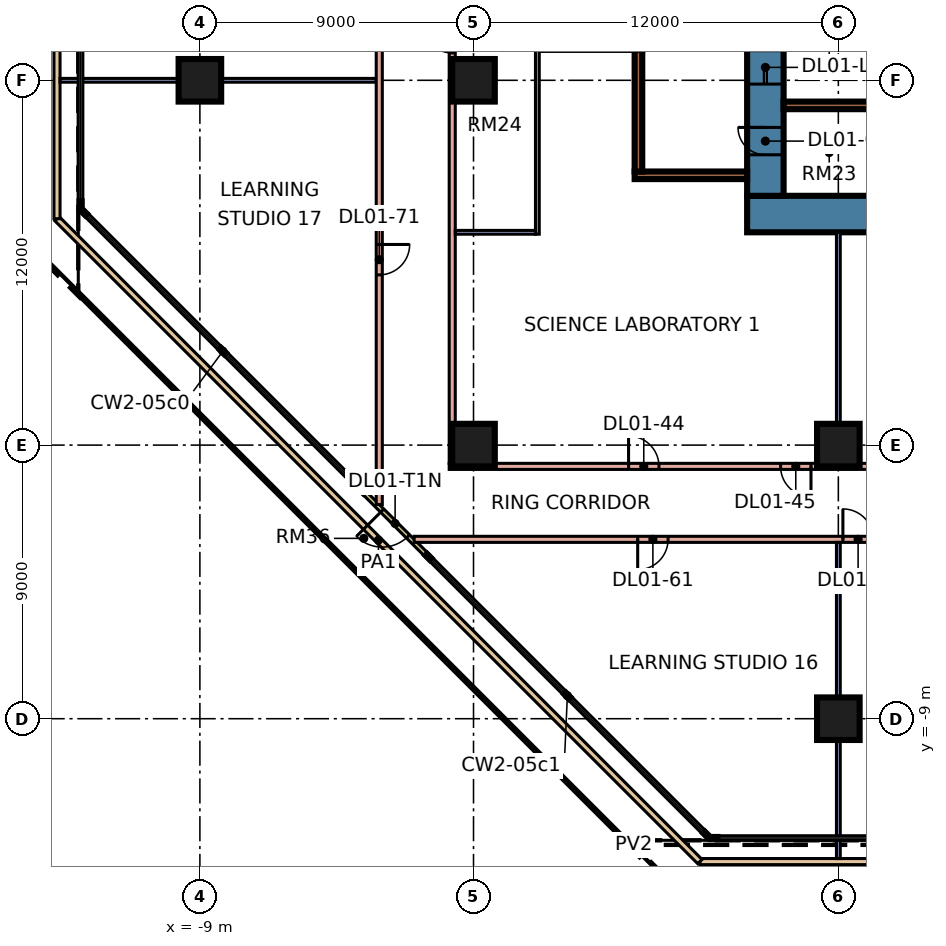
"""IFC4 building model, lengths in metres.
Left out: names, types, materials, properties, quantities, classifications, styles, units other than length and angle.
Written with IfcOpenShell. Run it as: python <this file> out.ifc"""

import sys

from ifc_helpers import new_model, si_unit, direction, frame, frame_2d, origin, origin_2d, place, context, subcontext, project, spatial, rectangle, extrude, element, fill, save


model = new_model("IFC4")
c1 = context("Model", 3, precision=1e-05, world=origin(), true_north=direction((0.0, 1.0)))
c2 = subcontext(c1, "Body", "Model", "MODEL_VIEW")
j1 = project(units=[si_unit("LENGTHUNIT", "METRE"), si_unit("PLANEANGLEUNIT", "RADIAN")], contexts=[c1])
p1 = place(None, origin())
s1 = spatial("IfcSite", under=j1, at=p1, CompositionType="ELEMENT")
p2 = place(p1, origin())
s2 = spatial("IfcBuilding", under=s1, at=p2, CompositionType="ELEMENT")
p3 = place(p2, frame((0.0, 0.0, 7.2)))
s3 = spatial("IfcBuildingStorey", under=s2, at=p3, CompositionType="ELEMENT", Elevation=7.2)
for number, where, z_axis, x_axis in (
    (1, (12.0, -9.0, 0.0), (0.0, 0.0, 1.0), (1.0, 0.0, 0.0)),
    (2, (0.0, 0.0, 0.0), (0.0, 0.0, 1.0), (1.0, 0.0, 0.0)),
    (3, (12.0, 0.0, 0.0), (0.0, 0.0, 1.0), (1.0, 0.0, 0.0)),
    (4, (-9.0, 12.0, 0.0), (0.0, 0.0, 1.0), (1.0, 0.0, 0.0)),
    (5, (0.0, 12.0, 0.0), (0.0, 0.0, 1.0), (1.0, 0.0, 0.0)),
):
    element("IfcColumn", number, at=place(p3, frame(where, z_axis=z_axis, x_axis=x_axis)), inside=s3, PredefinedType="COLUMN", context=c2, shape_type="SweptSolid", body=[
        extrude(rectangle(XDim=1.4, YDim=1.4, at=origin_2d()), origin(), (0.0, 0.0, 1.0), 4.8),
    ])
p4 = place(p3, frame((9.0, 7.6, 0.0), z_axis=(0.0, 0.0, 1.0), x_axis=(1.0, 0.0, 0.0)))
e6 = element("IfcWall", 6, at=p4, inside=s3, PredefinedType="SHEAR", context=c2, shape_type="SweptSolid", body=[
    extrude(rectangle(XDim=25.0, YDim=1.2, at=frame_2d((12.5, 0.0))), origin(), (0.0, 0.0, 1.0), 4.8),
])
p5 = place(p3, frame((9.6, 8.2, 0.0), z_axis=(0.0, 0.0, 1.0), x_axis=(0.0, 1.0, 0.0)))
e7 = element("IfcWall", 7, at=p5, inside=s3, PredefinedType="SHEAR", context=c2, shape_type="SweptSolid", body=[
    extrude(rectangle(XDim=10.6, YDim=1.2, at=frame_2d((5.3, 0.0))), origin(), (0.0, 0.0, 1.0), 4.8),
])
p6 = place(p5, frame((3.675, 0.0, 0.0)))
e8 = element("IfcOpeningElement", 8, at=p6, cuts=e7, PredefinedType="OPENING", context=c2, shape_type="SweptSolid", body=[
    extrude(rectangle(XDim=1.1, YDim=2.2, at=frame_2d((0.55, 1.1))), frame((0.0, 0.61, 0.0), z_axis=(0.0, -1.0, 0.0), x_axis=(1.0, 0.0, 0.0)), (0.0, 0.0, 1.0), 1.22),
])
p7 = place(p5, frame((6.175, 0.0, 0.0)))
e9 = element("IfcOpeningElement", 9, at=p7, cuts=e7, PredefinedType="OPENING", context=c2, shape_type="SweptSolid", body=[
    extrude(rectangle(XDim=1.1, YDim=2.2, at=frame_2d((0.55, 1.1))), frame((0.0, 0.61, 0.0), z_axis=(0.0, -1.0, 0.0), x_axis=(1.0, 0.0, 0.0)), (0.0, 0.0, 1.0), 1.22),
])
p8 = place(p5, frame((8.8, 0.0, 0.0)))
e10 = element("IfcOpeningElement", 10, at=p8, cuts=e7, PredefinedType="OPENING", context=c2, shape_type="SweptSolid", body=[
    extrude(rectangle(XDim=1.1, YDim=2.2, at=frame_2d((0.55, 1.1))), frame((0.0, 0.61, 0.0), z_axis=(0.0, -1.0, 0.0), x_axis=(1.0, 0.0, 0.0)), (0.0, 0.0, 1.0), 1.22),
])
p9 = place(p5, frame((1.35, 0.0, 0.0)))
e11 = element("IfcOpeningElement", 11, at=p9, cuts=e7, PredefinedType="OPENING", context=c2, shape_type="SweptSolid", body=[
    extrude(rectangle(XDim=0.9, YDim=2.1, at=frame_2d((0.45, 1.05))), frame((0.0, 0.61, 0.0), z_axis=(0.0, -1.0, 0.0), x_axis=(1.0, 0.0, 0.0)), (0.0, 0.0, 1.0), 1.22),
])
p10 = place(p3, frame((10.2, 11.175, 0.0), z_axis=(0.0, 0.0, 1.0), x_axis=(1.0, 0.0, 0.0)))
e12 = element("IfcWall", 12, at=p10, inside=s3, PredefinedType="SHEAR", context=c2, shape_type="SweptSolid", body=[
    extrude(rectangle(XDim=3.0, YDim=0.25, at=frame_2d((1.5, 0.0))), origin(), (0.0, 0.0, 1.0), 4.8),
])
p11 = place(p3, frame((5.3, 8.875, 0.0), z_axis=(0.0, 0.0, 1.0), x_axis=(1.0, 0.0, 0.0)))
e13 = element("IfcWall", 13, at=p11, inside=s3, PredefinedType="SHEAR", context=c2, shape_type="SweptSolid", body=[
    extrude(rectangle(XDim=3.7, YDim=0.25, at=frame_2d((1.85, 0.0))), origin(), (0.0, 0.0, 1.0), 4.8),
])
p12 = place(p3, frame((5.425, 9.0, 0.0), z_axis=(0.0, 0.0, 1.0), x_axis=(0.0, 1.0, 0.0)))
e14 = element("IfcWall", 14, at=p12, inside=s3, PredefinedType="SHEAR", context=c2, shape_type="SweptSolid", body=[
    extrude(rectangle(XDim=4.0, YDim=0.25, at=frame_2d((2.0, 0.0))), origin(), (0.0, 0.0, 1.0), 4.8),
])
p13 = place(p3, frame((-3.639, -1.518, 0.0), z_axis=(0.0, 0.0, 1.0), x_axis=(0.707106781187, -0.707106781187, 0.0)))
e15 = element("IfcWall", 15, at=p13, inside=s3, PredefinedType="SOLIDWALL", context=c2, shape_type="SweptSolid", body=[
    extrude(rectangle(XDim=3.0, YDim=0.15, at=frame_2d((1.5, 0.0))), origin(), (0.0, 0.0, 1.0), 4.4),
])
p14 = place(p13, frame((0.9, 0.0, 0.0)))
e16 = element("IfcOpeningElement", 16, at=p14, cuts=e15, PredefinedType="OPENING", context=c2, shape_type="SweptSolid", body=[
    extrude(rectangle(XDim=1.2, YDim=2.4, at=frame_2d((0.6, 1.2))), frame((0.0, 0.085, 0.0), z_axis=(0.0, -1.0, 0.0), x_axis=(1.0, 0.0, 0.0)), (0.0, 0.0, 1.0), 0.17),
])
p15 = place(p3, frame((75.553, -13.7, 0.0), z_axis=(0.0, 0.0, 1.0), x_axis=(-1.0, 0.0, 0.0)))
e17 = element("IfcWall", 17, at=p15, inside=s3, PredefinedType="PARAPET", context=c2, shape_type="SweptSolid", body=[
    extrude(rectangle(XDim=68.107, YDim=0.2, at=frame_2d((34.053, 0.0))), origin(), (0.0, 0.0, 1.0), 0.5),
])
p16 = place(p3, frame((7.447, -13.7, 0.0), z_axis=(0.0, 0.0, 1.0), x_axis=(-0.707106781187, 0.707106781187, 0.0)))
e18 = element("IfcWall", 18, at=p16, inside=s3, PredefinedType="PARAPET", context=c2, shape_type="SweptSolid", body=[
    extrude(rectangle(XDim=29.906, YDim=0.2, at=frame_2d((14.953, 0.0))), origin(), (0.0, 0.0, 1.0), 0.5),
])
p17 = place(p3, frame((-13.7, 7.447, 0.0), z_axis=(0.0, 0.0, 1.0), x_axis=(0.0, 1.0, 0.0)))
e19 = element("IfcWall", 19, at=p17, inside=s3, PredefinedType="PARAPET", context=c2, shape_type="SweptSolid", body=[
    extrude(rectangle(XDim=59.107, YDim=0.2, at=frame_2d((29.553, 0.0))), origin(), (0.0, 0.0, 1.0), 0.5),
])
p18 = place(p3, frame((-13.6, 12.0, 0.0), z_axis=(0.0, 0.0, 1.0), x_axis=(1.0, 0.0, 0.0)))
e20 = element("IfcWall", 20, at=p18, inside=s3, PredefinedType="PARTITIONING", context=c2, shape_type="SweptSolid", body=[
    extrude(rectangle(XDim=10.4, YDim=0.125, at=frame_2d((5.2, 0.0))), origin(), (0.0, 0.0, 1.0), 4.4),
])
p19 = place(p3, frame((-3.1, -1.953, 0.0), z_axis=(0.0, 0.0, 1.0), x_axis=(0.0, 1.0, 0.0)))
e21 = element("IfcWall", 21, at=p19, inside=s3, PredefinedType="PARTITIONING", context=c2, shape_type="SweptSolid", body=[
    extrude(rectangle(XDim=68.053, YDim=0.2, at=frame_2d((34.026, 0.0))), origin(), (0.0, 0.0, 1.0), 4.4),
])
p20 = place(p19, frame((7.553, 0.0, 0.0)))
e22 = element("IfcOpeningElement", 22, at=p20, cuts=e21, PredefinedType="OPENING", context=c2, shape_type="SweptSolid", body=[
    extrude(rectangle(XDim=1.0, YDim=2.1, at=frame_2d((0.5, 1.05))), frame((0.0, 0.11, 0.0), z_axis=(0.0, -1.0, 0.0), x_axis=(1.0, 0.0, 0.0)), (0.0, 0.0, 1.0), 0.22),
])
p21 = place(p19, frame((19.553, 0.0, 0.0)))
e23 = element("IfcOpeningElement", 23, at=p21, cuts=e21, PredefinedType="OPENING", context=c2, shape_type="SweptSolid", body=[
    extrude(rectangle(XDim=1.0, YDim=2.1, at=frame_2d((0.5, 1.05))), frame((0.0, 0.11, 0.0), z_axis=(0.0, -1.0, 0.0), x_axis=(1.0, 0.0, 0.0)), (0.0, 0.0, 1.0), 0.22),
])
p22 = place(p19, frame((24.803, 0.0, 0.0)))
e24 = element("IfcOpeningElement", 24, at=p22, cuts=e21, PredefinedType="OPENING", context=c2, shape_type="SweptSolid", body=[
    extrude(rectangle(XDim=1.0, YDim=2.1, at=frame_2d((0.5, 1.05))), frame((0.0, 0.11, 0.0), z_axis=(0.0, -1.0, 0.0), x_axis=(1.0, 0.0, 0.0)), (0.0, 0.0, 1.0), 0.22),
])
p23 = place(p19, frame((31.553, 0.0, 0.0)))
e25 = element("IfcOpeningElement", 25, at=p23, cuts=e21, PredefinedType="OPENING", context=c2, shape_type="SweptSolid", body=[
    extrude(rectangle(XDim=1.0, YDim=2.1, at=frame_2d((0.5, 1.05))), frame((0.0, 0.11, 0.0), z_axis=(0.0, -1.0, 0.0), x_axis=(1.0, 0.0, 0.0)), (0.0, 0.0, 1.0), 0.22),
])
p24 = place(p19, frame((36.803, 0.0, 0.0)))
e26 = element("IfcOpeningElement", 26, at=p24, cuts=e21, PredefinedType="OPENING", context=c2, shape_type="SweptSolid", body=[
    extrude(rectangle(XDim=1.0, YDim=2.1, at=frame_2d((0.5, 1.05))), frame((0.0, 0.11, 0.0), z_axis=(0.0, -1.0, 0.0), x_axis=(1.0, 0.0, 0.0)), (0.0, 0.0, 1.0), 0.22),
])
p25 = place(p19, frame((42.053, 0.0, 0.0)))
e27 = element("IfcOpeningElement", 27, at=p25, cuts=e21, PredefinedType="OPENING", context=c2, shape_type="SweptSolid", body=[
    extrude(rectangle(XDim=1.0, YDim=2.1, at=frame_2d((0.5, 1.05))), frame((0.0, 0.11, 0.0), z_axis=(0.0, -1.0, 0.0), x_axis=(1.0, 0.0, 0.0)), (0.0, 0.0, 1.0), 0.22),
])
p26 = place(p19, frame((51.053, 0.0, 0.0)))
e28 = element("IfcOpeningElement", 28, at=p26, cuts=e21, PredefinedType="OPENING", context=c2, shape_type="SweptSolid", body=[
    extrude(rectangle(XDim=1.0, YDim=2.1, at=frame_2d((0.5, 1.05))), frame((0.0, 0.11, 0.0), z_axis=(0.0, -1.0, 0.0), x_axis=(1.0, 0.0, 0.0)), (0.0, 0.0, 1.0), 0.22),
])
p27 = place(p19, frame((60.053, 0.0, 0.0)))
e29 = element("IfcOpeningElement", 29, at=p27, cuts=e21, PredefinedType="OPENING", context=c2, shape_type="SweptSolid", body=[
    extrude(rectangle(XDim=1.0, YDim=2.1, at=frame_2d((0.5, 1.05))), frame((0.0, 0.11, 0.0), z_axis=(0.0, -1.0, 0.0), x_axis=(1.0, 0.0, 0.0)), (0.0, 0.0, 1.0), 0.22),
])
p28 = place(p19, frame((65.903, 0.0, 0.0)))
e30 = element("IfcOpeningElement", 30, at=p28, cuts=e21, PredefinedType="OPENING", context=c2, shape_type="SweptSolid", body=[
    extrude(rectangle(XDim=1.0, YDim=2.1, at=frame_2d((0.5, 1.05))), frame((0.0, 0.11, 0.0), z_axis=(0.0, -1.0, 0.0), x_axis=(1.0, 0.0, 0.0)), (0.0, 0.0, 1.0), 0.22),
])
p29 = place(p3, frame((-1.953, -3.1, 0.0), z_axis=(0.0, 0.0, 1.0), x_axis=(1.0, 0.0, 0.0)))
e31 = element("IfcWall", 31, at=p29, inside=s3, PredefinedType="PARTITIONING", context=c2, shape_type="SweptSolid", body=[
    extrude(rectangle(XDim=77.053, YDim=0.2, at=frame_2d((38.526, 0.0))), origin(), (0.0, 0.0, 1.0), 4.4),
])
p30 = place(p29, frame((7.353, 0.0, 0.0)))
e32 = element("IfcOpeningElement", 32, at=p30, cuts=e31, PredefinedType="OPENING", context=c2, shape_type="SweptSolid", body=[
    extrude(rectangle(XDim=1.0, YDim=2.1, at=frame_2d((0.5, 1.05))), frame((0.0, 0.11, 0.0), z_axis=(0.0, -1.0, 0.0), x_axis=(1.0, 0.0, 0.0)), (0.0, 0.0, 1.0), 0.22),
])
p31 = place(p29, frame((19.353, 0.0, 0.0)))
e33 = element("IfcOpeningElement", 33, at=p31, cuts=e31, PredefinedType="OPENING", context=c2, shape_type="SweptSolid", body=[
    extrude(rectangle(XDim=1.0, YDim=2.1, at=frame_2d((0.5, 1.05))), frame((0.0, 0.11, 0.0), z_axis=(0.0, -1.0, 0.0), x_axis=(1.0, 0.0, 0.0)), (0.0, 0.0, 1.0), 0.22),
])
p32 = place(p29, frame((14.103, 0.0, 0.0)))
e34 = element("IfcOpeningElement", 34, at=p32, cuts=e31, PredefinedType="OPENING", context=c2, shape_type="SweptSolid", body=[
    extrude(rectangle(XDim=1.0, YDim=2.1, at=frame_2d((0.5, 1.05))), frame((0.0, 0.11, 0.0), z_axis=(0.0, -1.0, 0.0), x_axis=(1.0, 0.0, 0.0)), (0.0, 0.0, 1.0), 0.22),
])
p33 = place(p29, frame((31.353, 0.0, 0.0)))
e35 = element("IfcOpeningElement", 35, at=p33, cuts=e31, PredefinedType="OPENING", context=c2, shape_type="SweptSolid", body=[
    extrude(rectangle(XDim=1.0, YDim=2.1, at=frame_2d((0.5, 1.05))), frame((0.0, 0.11, 0.0), z_axis=(0.0, -1.0, 0.0), x_axis=(1.0, 0.0, 0.0)), (0.0, 0.0, 1.0), 0.22),
])
p34 = place(p29, frame((26.103, 0.0, 0.0)))
e36 = element("IfcOpeningElement", 36, at=p34, cuts=e31, PredefinedType="OPENING", context=c2, shape_type="SweptSolid", body=[
    extrude(rectangle(XDim=1.0, YDim=2.1, at=frame_2d((0.5, 1.05))), frame((0.0, 0.11, 0.0), z_axis=(0.0, -1.0, 0.0), x_axis=(1.0, 0.0, 0.0)), (0.0, 0.0, 1.0), 0.22),
])
p35 = place(p29, frame((41.853, 0.0, 0.0)))
e37 = element("IfcOpeningElement", 37, at=p35, cuts=e31, PredefinedType="OPENING", context=c2, shape_type="SweptSolid", body=[
    extrude(rectangle(XDim=1.0, YDim=2.1, at=frame_2d((0.5, 1.05))), frame((0.0, 0.11, 0.0), z_axis=(0.0, -1.0, 0.0), x_axis=(1.0, 0.0, 0.0)), (0.0, 0.0, 1.0), 0.22),
])
p36 = place(p29, frame((50.853, 0.0, 0.0)))
e38 = element("IfcOpeningElement", 38, at=p36, cuts=e31, PredefinedType="OPENING", context=c2, shape_type="SweptSolid", body=[
    extrude(rectangle(XDim=1.0, YDim=2.1, at=frame_2d((0.5, 1.05))), frame((0.0, 0.11, 0.0), z_axis=(0.0, -1.0, 0.0), x_axis=(1.0, 0.0, 0.0)), (0.0, 0.0, 1.0), 0.22),
])
p37 = place(p29, frame((59.853, 0.0, 0.0)))
e39 = element("IfcOpeningElement", 39, at=p37, cuts=e31, PredefinedType="OPENING", context=c2, shape_type="SweptSolid", body=[
    extrude(rectangle(XDim=1.0, YDim=2.1, at=frame_2d((0.5, 1.05))), frame((0.0, 0.11, 0.0), z_axis=(0.0, -1.0, 0.0), x_axis=(1.0, 0.0, 0.0)), (0.0, 0.0, 1.0), 0.22),
])
p38 = place(p29, frame((68.853, 0.0, 0.0)))
e40 = element("IfcOpeningElement", 40, at=p38, cuts=e31, PredefinedType="OPENING", context=c2, shape_type="SweptSolid", body=[
    extrude(rectangle(XDim=1.0, YDim=2.1, at=frame_2d((0.5, 1.05))), frame((0.0, 0.11, 0.0), z_axis=(0.0, -1.0, 0.0), x_axis=(1.0, 0.0, 0.0)), (0.0, 0.0, 1.0), 0.22),
])
p39 = place(p29, frame((75.103, 0.0, 0.0)))
e41 = element("IfcOpeningElement", 41, at=p39, cuts=e31, PredefinedType="OPENING", context=c2, shape_type="SweptSolid", body=[
    extrude(rectangle(XDim=1.0, YDim=2.1, at=frame_2d((0.5, 1.05))), frame((0.0, 0.11, 0.0), z_axis=(0.0, -1.0, 0.0), x_axis=(1.0, 0.0, 0.0)), (0.0, 0.0, 1.0), 0.22),
])
p40 = place(p3, frame((-0.8, -0.7, 0.0), z_axis=(0.0, 0.0, 1.0), x_axis=(1.0, 0.0, 0.0)))
e42 = element("IfcWall", 42, at=p40, inside=s3, PredefinedType="PARTITIONING", context=c2, shape_type="SweptSolid", body=[
    extrude(rectangle(XDim=45.8, YDim=0.2, at=frame_2d((22.9, 0.0))), origin(), (0.0, 0.0, 1.0), 4.4),
])
p41 = place(p40, frame((40.9, 0.0, 0.0)))
e43 = element("IfcOpeningElement", 43, at=p41, cuts=e42, PredefinedType="OPENING", context=c2, shape_type="SweptSolid", body=[
    extrude(rectangle(XDim=1.0, YDim=2.1, at=frame_2d((0.5, 1.05))), frame((0.0, 0.11, 0.0), z_axis=(0.0, -1.0, 0.0), x_axis=(1.0, 0.0, 0.0)), (0.0, 0.0, 1.0), 0.22),
])
p42 = place(p40, frame((5.9, 0.0, 0.0)))
e44 = element("IfcOpeningElement", 44, at=p42, cuts=e42, PredefinedType="OPENING", context=c2, shape_type="SweptSolid", body=[
    extrude(rectangle(XDim=1.0, YDim=2.1, at=frame_2d((0.5, 1.05))), frame((0.0, 0.11, 0.0), z_axis=(0.0, -1.0, 0.0), x_axis=(1.0, 0.0, 0.0)), (0.0, 0.0, 1.0), 0.22),
])
p43 = place(p40, frame((10.9, 0.0, 0.0)))
e45 = element("IfcOpeningElement", 45, at=p43, cuts=e42, PredefinedType="OPENING", context=c2, shape_type="SweptSolid", body=[
    extrude(rectangle(XDim=1.0, YDim=2.1, at=frame_2d((0.5, 1.05))), frame((0.0, 0.11, 0.0), z_axis=(0.0, -1.0, 0.0), x_axis=(1.0, 0.0, 0.0)), (0.0, 0.0, 1.0), 0.22),
])
p44 = place(p40, frame((18.4, 0.0, 0.0)))
e46 = element("IfcOpeningElement", 46, at=p44, cuts=e42, PredefinedType="OPENING", context=c2, shape_type="SweptSolid", body=[
    extrude(rectangle(XDim=1.0, YDim=2.1, at=frame_2d((0.5, 1.05))), frame((0.0, 0.11, 0.0), z_axis=(0.0, -1.0, 0.0), x_axis=(1.0, 0.0, 0.0)), (0.0, 0.0, 1.0), 0.22),
])
p45 = place(p40, frame((30.4, 0.0, 0.0)))
e47 = element("IfcOpeningElement", 47, at=p45, cuts=e42, PredefinedType="OPENING", context=c2, shape_type="SweptSolid", body=[
    extrude(rectangle(XDim=1.0, YDim=2.1, at=frame_2d((0.5, 1.05))), frame((0.0, 0.11, 0.0), z_axis=(0.0, -1.0, 0.0), x_axis=(1.0, 0.0, 0.0)), (0.0, 0.0, 1.0), 0.22),
])
p46 = place(p3, frame((-0.7, -0.6, 0.0), z_axis=(0.0, 0.0, 1.0), x_axis=(0.0, 1.0, 0.0)))
e48 = element("IfcWall", 48, at=p46, inside=s3, PredefinedType="PARTITIONING", context=c2, shape_type="SweptSolid", body=[
    extrude(rectangle(XDim=23.6, YDim=0.2, at=frame_2d((11.8, 0.0))), origin(), (0.0, 0.0, 1.0), 4.4),
])
p47 = place(p46, frame((21.25, 0.0, 0.0)))
e49 = element("IfcOpeningElement", 49, at=p47, cuts=e48, PredefinedType="OPENING", context=c2, shape_type="SweptSolid", body=[
    extrude(rectangle(XDim=1.8, YDim=2.1, at=frame_2d((0.9, 1.05))), frame((0.0, 0.11, 0.0), z_axis=(0.0, -1.0, 0.0), x_axis=(1.0, 0.0, 0.0)), (0.0, 0.0, 1.0), 0.22),
])
p48 = place(p46, frame((13.5, 0.0, 0.0)))
e50 = element("IfcOpeningElement", 50, at=p48, cuts=e48, PredefinedType="OPENING", context=c2, shape_type="SweptSolid", body=[
    extrude(rectangle(XDim=1.0, YDim=2.1, at=frame_2d((0.5, 1.05))), frame((0.0, 0.11, 0.0), z_axis=(0.0, -1.0, 0.0), x_axis=(1.0, 0.0, 0.0)), (0.0, 0.0, 1.0), 0.22),
])
p49 = place(p3, frame((-0.6, 7.0, 0.0), z_axis=(0.0, 0.0, 1.0), x_axis=(1.0, 0.0, 0.0)))
e51 = element("IfcWall", 51, at=p49, inside=s3, PredefinedType="PARTITIONING", context=c2, shape_type="SweptSolid", body=[
    extrude(rectangle(XDim=2.638, YDim=0.125, at=frame_2d((1.319, 0.0))), origin(), (0.0, 0.0, 1.0), 4.4),
])
p50 = place(p3, frame((2.1, 6.938, 0.0), z_axis=(0.0, 0.0, 1.0), x_axis=(0.0, 1.0, 0.0)))
e52 = element("IfcWall", 52, at=p50, inside=s3, PredefinedType="PARTITIONING", context=c2, shape_type="SweptSolid", body=[
    extrude(rectangle(XDim=6.062, YDim=0.125, at=frame_2d((3.031, 0.0))), origin(), (0.0, 0.0, 1.0), 4.4),
])
p51 = place(p3, frame((12.0, -13.6, 0.0), z_axis=(0.0, 0.0, 1.0), x_axis=(0.0, 1.0, 0.0)))
e53 = element("IfcWall", 53, at=p51, inside=s3, PredefinedType="PARTITIONING", context=c2, shape_type="SweptSolid", body=[
    extrude(rectangle(XDim=10.4, YDim=0.125, at=frame_2d((5.2, 0.0))), origin(), (0.0, 0.0, 1.0), 4.4),
])
p52 = place(p3, frame((12.0, -0.6, 0.0), z_axis=(0.0, 0.0, 1.0), x_axis=(0.0, 1.0, 0.0)))
e54 = element("IfcWall", 54, at=p52, inside=s3, PredefinedType="PARTITIONING", context=c2, shape_type="SweptSolid", body=[
    extrude(rectangle(XDim=7.6, YDim=0.125, at=frame_2d((3.8, 0.0))), origin(), (0.0, 0.0, 1.0), 4.4),
])
p53 = place(p14, frame((1.2, 0.0, 0.0), z_axis=(0.0, 0.0, 1.0), x_axis=(-1.0, 0.0, 0.0)))
e55 = element("IfcDoor", 55, at=p53, inside=s3, OperationType="DOUBLE_DOOR_SINGLE_SWING", PredefinedType="DOOR", context=c2, shape_type="SweptSolid", body=[
    extrude(rectangle(XDim=1.2, YDim=2.4, at=frame_2d((0.6, 1.2))), frame((0.0, 0.025, 0.0), z_axis=(0.0, -1.0, 0.0), x_axis=(1.0, 0.0, 0.0)), (0.0, 0.0, 1.0), 0.05),
])
fill(e16, e55)
p54 = place(p6, origin())
e56 = element("IfcDoor", 56, at=p54, inside=s3, OperationType="DOUBLE_DOOR_SLIDING", PredefinedType="DOOR", context=c2, shape_type="SweptSolid", body=[
    extrude(rectangle(XDim=1.1, YDim=2.2, at=frame_2d((0.55, 1.1))), frame((0.0, 0.025, 0.0), z_axis=(0.0, -1.0, 0.0), x_axis=(1.0, 0.0, 0.0)), (0.0, 0.0, 1.0), 0.05),
])
fill(e8, e56)
p55 = place(p9, frame((0.9, 0.0, 0.0), z_axis=(0.0, 0.0, 1.0), x_axis=(-1.0, 0.0, 0.0)))
e57 = element("IfcDoor", 57, at=p55, inside=s3, OperationType="SINGLE_SWING_RIGHT", PredefinedType="DOOR", context=c2, shape_type="SweptSolid", body=[
    extrude(rectangle(XDim=0.9, YDim=2.1, at=frame_2d((0.45, 1.05))), frame((0.0, 0.025, 0.0), z_axis=(0.0, -1.0, 0.0), x_axis=(1.0, 0.0, 0.0)), (0.0, 0.0, 1.0), 0.05),
])
fill(e11, e57)
p56 = place(p48, frame((1.0, 0.0, 0.0), z_axis=(0.0, 0.0, 1.0), x_axis=(-1.0, 0.0, 0.0)))
e58 = element("IfcDoor", 58, at=p56, inside=s3, OperationType="SINGLE_SWING_RIGHT", PredefinedType="DOOR", context=c2, shape_type="SweptSolid", body=[
    extrude(rectangle(XDim=1.0, YDim=2.1, at=frame_2d((0.5, 1.05))), frame((0.0, 0.025, 0.0), z_axis=(0.0, -1.0, 0.0), x_axis=(1.0, 0.0, 0.0)), (0.0, 0.0, 1.0), 0.05),
])
fill(e50, e58)
p57 = place(p42, origin())
e59 = element("IfcDoor", 59, at=p57, inside=s3, OperationType="SINGLE_SWING_LEFT", PredefinedType="DOOR", context=c2, shape_type="SweptSolid", body=[
    extrude(rectangle(XDim=1.0, YDim=2.1, at=frame_2d((0.5, 1.05))), frame((0.0, 0.025, 0.0), z_axis=(0.0, -1.0, 0.0), x_axis=(1.0, 0.0, 0.0)), (0.0, 0.0, 1.0), 0.05),
])
fill(e44, e59)
p58 = place(p43, origin())
e60 = element("IfcDoor", 60, at=p58, inside=s3, OperationType="SINGLE_SWING_RIGHT", PredefinedType="DOOR", context=c2, shape_type="SweptSolid", body=[
    extrude(rectangle(XDim=1.0, YDim=2.1, at=frame_2d((0.5, 1.05))), frame((0.0, 0.025, 0.0), z_axis=(0.0, -1.0, 0.0), x_axis=(1.0, 0.0, 0.0)), (0.0, 0.0, 1.0), 0.05),
])
fill(e45, e60)
p59 = place(p30, frame((1.0, 0.0, 0.0), z_axis=(0.0, 0.0, 1.0), x_axis=(-1.0, 0.0, 0.0)))
e61 = element("IfcDoor", 61, at=p59, inside=s3, OperationType="SINGLE_SWING_LEFT", PredefinedType="DOOR", context=c2, shape_type="SweptSolid", body=[
    extrude(rectangle(XDim=1.0, YDim=2.1, at=frame_2d((0.5, 1.05))), frame((0.0, 0.025, 0.0), z_axis=(0.0, -1.0, 0.0), x_axis=(1.0, 0.0, 0.0)), (0.0, 0.0, 1.0), 0.05),
])
fill(e32, e61)
p60 = place(p32, origin())
e62 = element("IfcDoor", 62, at=p60, inside=s3, OperationType="SINGLE_SWING_LEFT", PredefinedType="DOOR", context=c2, shape_type="SweptSolid", body=[
    extrude(rectangle(XDim=1.0, YDim=2.1, at=frame_2d((0.5, 1.05))), frame((0.0, 0.025, 0.0), z_axis=(0.0, -1.0, 0.0), x_axis=(1.0, 0.0, 0.0)), (0.0, 0.0, 1.0), 0.05),
])
fill(e34, e62)
p61 = place(p20, origin())
e63 = element("IfcDoor", 63, at=p61, inside=s3, OperationType="SINGLE_SWING_RIGHT", PredefinedType="DOOR", context=c2, shape_type="SweptSolid", body=[
    extrude(rectangle(XDim=1.0, YDim=2.1, at=frame_2d((0.5, 1.05))), frame((0.0, 0.025, 0.0), z_axis=(0.0, -1.0, 0.0), x_axis=(1.0, 0.0, 0.0)), (0.0, 0.0, 1.0), 0.05),
])
fill(e22, e63)
save(model, sys.argv[1])
